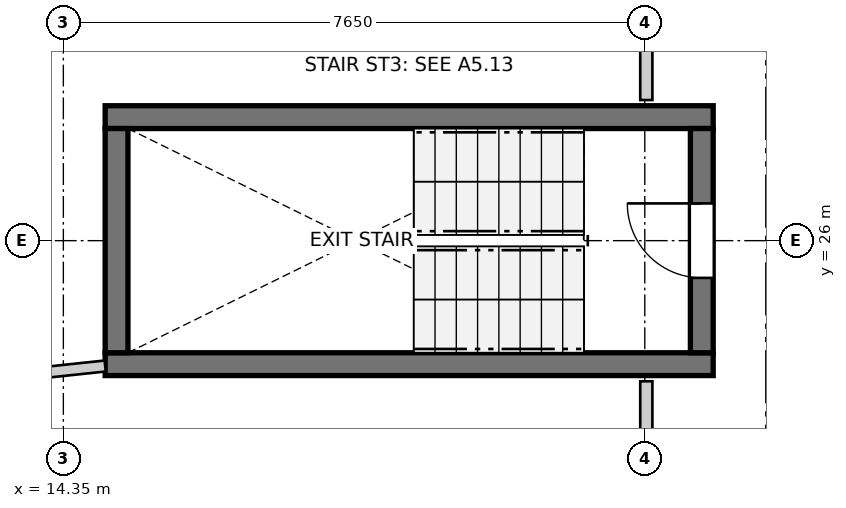
"""IFC4 building model, lengths in metres.
Left out: names, types, materials, properties, quantities, classifications, styles, units other than length and angle.
Written with IfcOpenShell. Run it as: python <this file> out.ifc"""

import sys

from ifc_helpers import new_model, si_unit, direction, frame, frame_2d, origin, place, context, subcontext, project, spatial, rectangle, extrude, source, transform, mapped, element, fill, save


model = new_model("IFC4")
c1 = context("Model", 3, precision=1e-05, world=origin(), true_north=direction((0.0, 1.0)))
c2 = subcontext(c1, "Body", "Model", "MODEL_VIEW")
j1 = project(units=[si_unit("LENGTHUNIT", "METRE"), si_unit("PLANEANGLEUNIT", "RADIAN")], contexts=[c1])
p1 = place(None, origin())
s1 = spatial("IfcSite", under=j1, at=p1, CompositionType="ELEMENT")
p2 = place(p1, origin())
s2 = spatial("IfcBuilding", under=s1, at=p2, CompositionType="ELEMENT")
p3 = place(p2, frame((0.0, 0.0, 7.8)))
s3 = spatial("IfcBuildingStorey", under=s2, at=p3, CompositionType="ELEMENT", Elevation=7.8)
for number, where, z_axis, x_axis in (
    (1, (14.9, 24.375, 0.0), (0.0, 0.0, 1.0), (1.0, 0.0, 0.0)),
    (2, (22.9, 27.625, 0.0), (0.0, 0.0, 1.0), (-1.0, 0.0, 0.0)),
):
    element("IfcWall", number, at=place(p3, frame(where, z_axis=z_axis, x_axis=x_axis)), inside=s3, PredefinedType="SHEAR", context=c2, shape_type="SweptSolid", body=[
        extrude(rectangle(XDim=8.0, YDim=0.3, at=frame_2d((4.0, 0.0))), origin(), (0.0, 0.0, 1.0), 2.94),
    ])
p4 = place(p3, frame((15.05, 27.475, 0.0), z_axis=(0.0, 0.0, 1.0), x_axis=(0.0, -1.0, 0.0)))
e3 = element("IfcWall", 3, at=p4, inside=s3, PredefinedType="SHEAR", context=c2, shape_type="SweptSolid", body=[
    extrude(rectangle(XDim=2.95, YDim=0.3, at=frame_2d((1.475, 0.0))), origin(), (0.0, 0.0, 1.0), 2.94),
])
p5 = place(p3, frame((22.75, 24.525, 0.0), z_axis=(0.0, 0.0, 1.0), x_axis=(0.0, 1.0, 0.0)))
e4 = element("IfcWall", 4, at=p5, inside=s3, PredefinedType="SHEAR", context=c2, shape_type="SweptSolid", body=[
    extrude(rectangle(XDim=2.95, YDim=0.3, at=frame_2d((1.475, 0.0))), origin(), (0.0, 0.0, 1.0), 2.94),
])
p6 = place(p5, frame((0.985, 0.0, 0.0)))
e5 = element("IfcOpeningElement", 5, at=p6, cuts=e4, PredefinedType="OPENING", context=c2, shape_type="SweptSolid", body=[
    extrude(rectangle(XDim=0.98, YDim=2.15, at=frame_2d((0.49, 1.075))), frame((0.0, 0.16, 0.0), z_axis=(0.0, -1.0, 0.0), x_axis=(1.0, 0.0, 0.0)), (0.0, 0.0, 1.0), 0.32),
])
p7 = place(p3, frame((22.02, 27.85, 0.0), z_axis=(0.0, 0.0, 1.0), x_axis=(0.0, 1.0, 0.0)))
e6 = element("IfcWall", 6, at=p7, inside=s3, PredefinedType="PARTITIONING", context=c2, shape_type="SweptSolid", body=[
    extrude(rectangle(XDim=3.625, YDim=0.16, at=frame_2d((1.812, 0.0))), origin(), (0.0, 0.0, 1.0), 2.94),
])
p8 = place(p7, frame((1.353, 0.0, 0.0)))
e7 = element("IfcOpeningElement", 7, at=p8, cuts=e6, PredefinedType="OPENING", context=c2, shape_type="SweptSolid", body=[
    extrude(rectangle(XDim=0.96, YDim=2.1, at=frame_2d((0.48, 1.05))), frame((0.0, 0.09, 0.0), z_axis=(0.0, -1.0, 0.0), x_axis=(1.0, 0.0, 0.0)), (0.0, 0.0, 1.0), 0.18),
])
p9 = place(p3, frame((22.02, 21.233, 0.0), z_axis=(0.0, 0.0, 1.0), x_axis=(0.0, 1.0, 0.0)))
e8 = element("IfcWall", 8, at=p9, inside=s3, PredefinedType="PARTITIONING", context=c2, shape_type="SweptSolid", body=[
    extrude(rectangle(XDim=2.917, YDim=0.16, at=frame_2d((1.458, 0.0))), origin(), (0.0, 0.0, 1.0), 2.94),
])
p10 = place(p9, frame((0.906, 0.0, 0.0)))
e9 = element("IfcOpeningElement", 9, at=p10, cuts=e8, PredefinedType="OPENING", context=c2, shape_type="SweptSolid", body=[
    extrude(rectangle(XDim=1.3, YDim=2.1, at=frame_2d((0.65, 1.05))), frame((0.0, 0.09, 0.0), z_axis=(0.0, -1.0, 0.0), x_axis=(1.0, 0.0, 0.0)), (0.0, 0.0, 1.0), 0.18),
])
p11 = place(p3, frame((4.231, 23.212, 0.0), z_axis=(0.0, 0.0, 1.0), x_axis=(0.994353055544, 0.106122575023, 0.0)))
e10 = element("IfcWall", 10, at=p11, inside=s3, PredefinedType="PARTITIONING", context=c2, shape_type="SweptSolid", body=[
    extrude(rectangle(XDim=10.73, YDim=0.145, at=frame_2d((5.365, 0.0))), origin(), (0.0, 0.0, 1.0), 2.94),
])
m1 = source(origin(), c2, "Body", "SweptSolid", [
    extrude(rectangle(XDim=0.98, YDim=2.15, at=frame_2d((0.49, 1.075))), frame((0.0, 0.025, 0.0), z_axis=(0.0, -1.0, 0.0), x_axis=(1.0, 0.0, 0.0)), (0.0, 0.0, 1.0), 0.05),
])
p12 = place(p6, origin())
e11 = element("IfcDoor", 11, at=p12, inside=s3, OperationType="SINGLE_SWING_RIGHT", PredefinedType="DOOR", context=c2, shape_type="MappedRepresentation", body=[
    mapped(m1, transform((0.0, 0.0, 0.0), x_axis=(1.0, 0.0, 0.0), y_axis=(0.0, 1.0, 0.0), z_axis=(0.0, 0.0, 1.0), scale=1.0)),
])
fill(e5, e11)
save(model, sys.argv[1])
